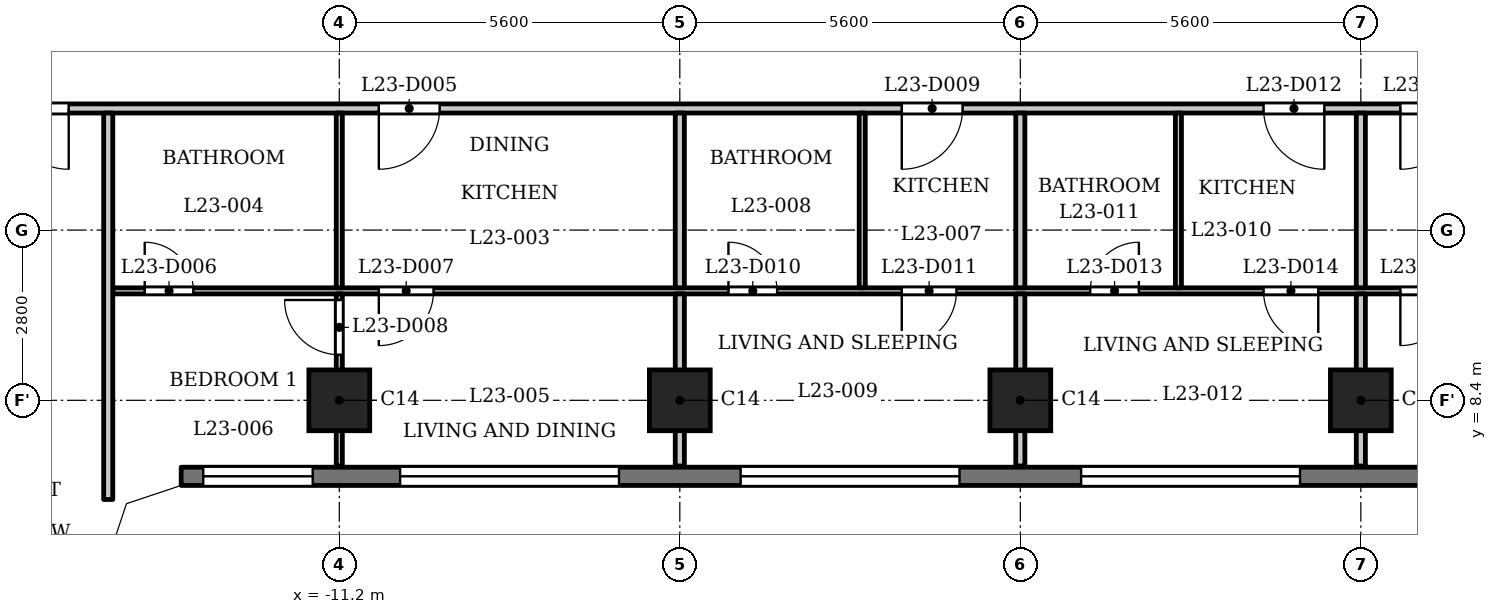
"""IFC4 building model, lengths in metres.
Left out: names, types, materials, properties, quantities, classifications, styles, units other than length and angle.
Written with IfcOpenShell. Run it as: python <this file> out.ifc"""

import sys

from ifc_helpers import new_model, si_unit, direction, frame, frame_2d, origin, origin_2d, place, context, subcontext, project, spatial, polyline, rectangle, outline, extrude, element, fill, save


model = new_model("IFC4")
c1 = context("Model", 3, precision=1e-05, world=origin(), true_north=direction((0.0, 1.0)))
c2 = subcontext(c1, "Body", "Model", "MODEL_VIEW")
j1 = project(units=[si_unit("LENGTHUNIT", "METRE"), si_unit("PLANEANGLEUNIT", "RADIAN")], contexts=[c1])
p1 = place(None, origin())
s1 = spatial("IfcSite", under=j1, at=p1, CompositionType="ELEMENT")
p2 = place(p1, origin())
s2 = spatial("IfcBuilding", under=s1, at=p2, CompositionType="ELEMENT")
p3 = place(p2, frame((0.0, 0.0, 93.8)))
s3 = spatial("IfcBuildingStorey", under=s2, at=p3, CompositionType="ELEMENT", Elevation=93.8)
for number, where, z_axis, x_axis in (
    (1, (-11.2, 8.4, 0.0), (0.0, 0.0, 1.0), (1.0, 0.0, 0.0)),
    (2, (-5.6, 8.4, 0.0), (0.0, 0.0, 1.0), (1.0, 0.0, 0.0)),
    (3, (0.0, 8.4, 0.0), (0.0, 0.0, 1.0), (1.0, 0.0, 0.0)),
    (4, (5.6, 8.4, 0.0), (0.0, 0.0, 1.0), (1.0, 0.0, 0.0)),
):
    element("IfcColumn", number, at=place(p3, frame(where, z_axis=z_axis, x_axis=x_axis)), inside=s3, PredefinedType="COLUMN", context=c2, shape_type="SweptSolid", body=[
        extrude(rectangle(XDim=1.0, YDim=1.0, at=origin_2d()), origin(), (0.0, 0.0, 1.0), 3.5),
    ])
p4 = place(p3, frame((-13.8, 7.15, 0.0), z_axis=(0.0, 0.0, 1.0), x_axis=(1.0, 0.0, 0.0)))
e5 = element("IfcWall", 5, at=p4, inside=s3, PredefinedType="SOLIDWALL", context=c2, shape_type="SweptSolid", body=[
    extrude(rectangle(XDim=27.6, YDim=0.3, at=frame_2d((13.8, 0.0))), origin(), (0.0, 0.0, 1.0), 3.2),
])
p5 = place(p4, frame((0.363, 0.0, 0.9)))
e6 = element("IfcOpeningElement", 6, at=p5, cuts=e5, PredefinedType="OPENING", context=c2, shape_type="SweptSolid", body=[
    extrude(rectangle(XDim=1.8, YDim=1.25, at=frame_2d((0.9, 0.625))), frame((0.0, 0.16, 0.0), z_axis=(0.0, -1.0, 0.0), x_axis=(1.0, 0.0, 0.0)), (0.0, 0.0, 1.0), 0.32),
])
p6 = place(p4, frame((3.6, 0.0, 1.2)))
e7 = element("IfcOpeningElement", 7, at=p6, cuts=e5, PredefinedType="OPENING", context=c2, shape_type="SweptSolid", body=[
    extrude(rectangle(XDim=3.6, YDim=0.95, at=frame_2d((1.8, 0.475))), frame((0.0, 0.16, 0.0), z_axis=(0.0, -1.0, 0.0), x_axis=(1.0, 0.0, 0.0)), (0.0, 0.0, 1.0), 0.32),
])
p7 = place(p4, frame((9.2, 0.0, 1.2)))
e8 = element("IfcOpeningElement", 8, at=p7, cuts=e5, PredefinedType="OPENING", context=c2, shape_type="SweptSolid", body=[
    extrude(rectangle(XDim=3.6, YDim=0.95, at=frame_2d((1.8, 0.475))), frame((0.0, 0.16, 0.0), z_axis=(0.0, -1.0, 0.0), x_axis=(1.0, 0.0, 0.0)), (0.0, 0.0, 1.0), 0.32),
])
p8 = place(p4, frame((14.8, 0.0, 1.2)))
e9 = element("IfcOpeningElement", 9, at=p8, cuts=e5, PredefinedType="OPENING", context=c2, shape_type="SweptSolid", body=[
    extrude(rectangle(XDim=3.6, YDim=0.95, at=frame_2d((1.8, 0.475))), frame((0.0, 0.16, 0.0), z_axis=(0.0, -1.0, 0.0), x_axis=(1.0, 0.0, 0.0)), (0.0, 0.0, 1.0), 0.32),
])
p9 = place(p4, frame((20.4, 0.0, 1.2)))
e10 = element("IfcOpeningElement", 10, at=p9, cuts=e5, PredefinedType="OPENING", context=c2, shape_type="SweptSolid", body=[
    extrude(rectangle(XDim=3.6, YDim=0.95, at=frame_2d((1.8, 0.475))), frame((0.0, 0.16, 0.0), z_axis=(0.0, -1.0, 0.0), x_axis=(1.0, 0.0, 0.0)), (0.0, 0.0, 1.0), 0.32),
])
p10 = place(p4, frame((25.438, 0.0, 0.9)))
e11 = element("IfcOpeningElement", 11, at=p10, cuts=e5, PredefinedType="OPENING", context=c2, shape_type="SweptSolid", body=[
    extrude(rectangle(XDim=1.8, YDim=1.25, at=frame_2d((0.9, 0.625))), frame((0.0, 0.16, 0.0), z_axis=(0.0, -1.0, 0.0), x_axis=(1.0, 0.0, 0.0)), (0.0, 0.0, 1.0), 0.32),
])
p11 = place(p3, frame((-14.925, 10.2, 0.0), z_axis=(0.0, 0.0, 1.0), x_axis=(1.0, 0.0, 0.0)))
e12 = element("IfcWall", 12, at=p11, inside=s3, PredefinedType="PARTITIONING", context=c2, shape_type="SweptSolid", body=[
    extrude(rectangle(XDim=29.85, YDim=0.1, at=frame_2d((14.925, 0.0))), origin(), (0.0, 0.0, 1.0), 3.2),
])
p12 = place(p11, frame((0.525, 0.0, 0.0)))
e13 = element("IfcOpeningElement", 13, at=p12, cuts=e12, PredefinedType="OPENING", context=c2, shape_type="SweptSolid", body=[
    extrude(rectangle(XDim=0.8, YDim=2.1, at=frame_2d((0.4, 1.05))), frame((0.0, 0.06, 0.0), z_axis=(0.0, -1.0, 0.0), x_axis=(1.0, 0.0, 0.0)), (0.0, 0.0, 1.0), 0.12),
])
p13 = place(p11, frame((4.375, 0.0, 0.0)))
e14 = element("IfcOpeningElement", 14, at=p13, cuts=e12, PredefinedType="OPENING", context=c2, shape_type="SweptSolid", body=[
    extrude(rectangle(XDim=0.9, YDim=2.1, at=frame_2d((0.45, 1.05))), frame((0.0, 0.06, 0.0), z_axis=(0.0, -1.0, 0.0), x_axis=(1.0, 0.0, 0.0)), (0.0, 0.0, 1.0), 0.12),
])
p14 = place(p11, frame((10.125, 0.0, 0.0)))
e15 = element("IfcOpeningElement", 15, at=p14, cuts=e12, PredefinedType="OPENING", context=c2, shape_type="SweptSolid", body=[
    extrude(rectangle(XDim=0.8, YDim=2.1, at=frame_2d((0.4, 1.05))), frame((0.0, 0.06, 0.0), z_axis=(0.0, -1.0, 0.0), x_axis=(1.0, 0.0, 0.0)), (0.0, 0.0, 1.0), 0.12),
])
p15 = place(p11, frame((12.975, 0.0, 0.0)))
e16 = element("IfcOpeningElement", 16, at=p15, cuts=e12, PredefinedType="OPENING", context=c2, shape_type="SweptSolid", body=[
    extrude(rectangle(XDim=0.9, YDim=2.1, at=frame_2d((0.45, 1.05))), frame((0.0, 0.06, 0.0), z_axis=(0.0, -1.0, 0.0), x_axis=(1.0, 0.0, 0.0)), (0.0, 0.0, 1.0), 0.12),
])
p16 = place(p11, frame((16.075, 0.0, 0.0)))
e17 = element("IfcOpeningElement", 17, at=p16, cuts=e12, PredefinedType="OPENING", context=c2, shape_type="SweptSolid", body=[
    extrude(rectangle(XDim=0.8, YDim=2.1, at=frame_2d((0.4, 1.05))), frame((0.0, 0.06, 0.0), z_axis=(0.0, -1.0, 0.0), x_axis=(1.0, 0.0, 0.0)), (0.0, 0.0, 1.0), 0.12),
])
p17 = place(p11, frame((18.925, 0.0, 0.0)))
e18 = element("IfcOpeningElement", 18, at=p17, cuts=e12, PredefinedType="OPENING", context=c2, shape_type="SweptSolid", body=[
    extrude(rectangle(XDim=0.9, YDim=2.1, at=frame_2d((0.45, 1.05))), frame((0.0, 0.06, 0.0), z_axis=(0.0, -1.0, 0.0), x_axis=(1.0, 0.0, 0.0)), (0.0, 0.0, 1.0), 0.12),
])
p18 = place(p11, frame((26.975, 0.0, 0.0)))
e19 = element("IfcOpeningElement", 19, at=p18, cuts=e12, PredefinedType="OPENING", context=c2, shape_type="SweptSolid", body=[
    extrude(rectangle(XDim=0.8, YDim=2.1, at=frame_2d((0.4, 1.05))), frame((0.0, 0.06, 0.0), z_axis=(0.0, -1.0, 0.0), x_axis=(1.0, 0.0, 0.0)), (0.0, 0.0, 1.0), 0.12),
])
p19 = place(p11, frame((21.175, 0.0, 0.0)))
e20 = element("IfcOpeningElement", 20, at=p19, cuts=e12, PredefinedType="OPENING", context=c2, shape_type="SweptSolid", body=[
    extrude(rectangle(XDim=0.9, YDim=2.1, at=frame_2d((0.45, 1.05))), frame((0.0, 0.06, 0.0), z_axis=(0.0, -1.0, 0.0), x_axis=(1.0, 0.0, 0.0)), (0.0, 0.0, 1.0), 0.12),
])
p20 = place(p3, frame((-17.4, 13.2, 0.0), z_axis=(0.0, 0.0, 1.0), x_axis=(1.0, 0.0, 0.0)))
e21 = element("IfcWall", 21, at=p20, inside=s3, PredefinedType="PARTITIONING", context=c2, shape_type="SweptSolid", body=[
    extrude(rectangle(XDim=34.8, YDim=0.15, at=frame_2d((17.4, 0.0))), origin(), (0.0, 0.0, 1.0), 3.2),
])
p21 = place(p20, frame((0.75, 0.0, 0.0)))
e22 = element("IfcOpeningElement", 22, at=p21, cuts=e21, PredefinedType="OPENING", context=c2, shape_type="SweptSolid", body=[
    extrude(rectangle(XDim=1.0, YDim=2.1, at=frame_2d((0.5, 1.05))), frame((0.0, 0.085, 0.0), z_axis=(0.0, -1.0, 0.0), x_axis=(1.0, 0.0, 0.0)), (0.0, 0.0, 1.0), 0.17),
])
p22 = place(p20, frame((33.15, 0.0, 0.0)))
e23 = element("IfcOpeningElement", 23, at=p22, cuts=e21, PredefinedType="OPENING", context=c2, shape_type="SweptSolid", body=[
    extrude(rectangle(XDim=1.0, YDim=2.1, at=frame_2d((0.5, 1.05))), frame((0.0, 0.085, 0.0), z_axis=(0.0, -1.0, 0.0), x_axis=(1.0, 0.0, 0.0)), (0.0, 0.0, 1.0), 0.17),
])
p23 = place(p20, frame((6.85, 0.0, 0.0)))
e24 = element("IfcOpeningElement", 24, at=p23, cuts=e21, PredefinedType="OPENING", context=c2, shape_type="SweptSolid", body=[
    extrude(rectangle(XDim=1.0, YDim=2.1, at=frame_2d((0.5, 1.05))), frame((0.0, 0.085, 0.0), z_axis=(0.0, -1.0, 0.0), x_axis=(1.0, 0.0, 0.0)), (0.0, 0.0, 1.0), 0.17),
])
p24 = place(p20, frame((15.45, 0.0, 0.0)))
e25 = element("IfcOpeningElement", 25, at=p24, cuts=e21, PredefinedType="OPENING", context=c2, shape_type="SweptSolid", body=[
    extrude(rectangle(XDim=1.0, YDim=2.1, at=frame_2d((0.5, 1.05))), frame((0.0, 0.085, 0.0), z_axis=(0.0, -1.0, 0.0), x_axis=(1.0, 0.0, 0.0)), (0.0, 0.0, 1.0), 0.17),
])
p25 = place(p20, frame((21.4, 0.0, 0.0)))
e26 = element("IfcOpeningElement", 26, at=p25, cuts=e21, PredefinedType="OPENING", context=c2, shape_type="SweptSolid", body=[
    extrude(rectangle(XDim=1.0, YDim=2.1, at=frame_2d((0.5, 1.05))), frame((0.0, 0.085, 0.0), z_axis=(0.0, -1.0, 0.0), x_axis=(1.0, 0.0, 0.0)), (0.0, 0.0, 1.0), 0.17),
])
p26 = place(p20, frame((23.65, 0.0, 0.0)))
e27 = element("IfcOpeningElement", 27, at=p26, cuts=e21, PredefinedType="OPENING", context=c2, shape_type="SweptSolid", body=[
    extrude(rectangle(XDim=1.0, YDim=2.1, at=frame_2d((0.5, 1.05))), frame((0.0, 0.085, 0.0), z_axis=(0.0, -1.0, 0.0), x_axis=(1.0, 0.0, 0.0)), (0.0, 0.0, 1.0), 0.17),
])
p27 = place(p3, frame((-15.0, 6.769, 0.0), z_axis=(0.0, 0.0, 1.0), x_axis=(0.0, 1.0, 0.0)))
e28 = element("IfcWall", 28, at=p27, inside=s3, PredefinedType="PARTITIONING", context=c2, shape_type="SweptSolid", body=[
    extrude(rectangle(XDim=6.356, YDim=0.15, at=frame_2d((3.178, 0.0))), origin(), (0.0, 0.0, 1.0), 3.2),
])
p28 = place(p3, frame((-11.2, 7.32, 0.0), z_axis=(0.0, 0.0, 1.0), x_axis=(0.0, 1.0, 0.0)))
e29 = element("IfcWall", 29, at=p28, inside=s3, PredefinedType="PARTITIONING", context=c2, shape_type="SweptSolid", body=[
    extrude(rectangle(XDim=2.83, YDim=0.1, at=frame_2d((1.415, 0.0))), origin(), (0.0, 0.0, 1.0), 3.2),
])
p29 = place(p28, frame((1.83, 0.0, 0.0)))
e30 = element("IfcOpeningElement", 30, at=p29, cuts=e29, PredefinedType="OPENING", context=c2, shape_type="SweptSolid", body=[
    extrude(rectangle(XDim=0.9, YDim=2.1, at=frame_2d((0.45, 1.05))), frame((0.0, 0.06, 0.0), z_axis=(0.0, -1.0, 0.0), x_axis=(1.0, 0.0, 0.0)), (0.0, 0.0, 1.0), 0.12),
])
p30 = place(p3, frame((-11.2, 10.25, 0.0), z_axis=(0.0, 0.0, 1.0), x_axis=(0.0, 1.0, 0.0)))
e31 = element("IfcWall", 31, at=p30, inside=s3, PredefinedType="PARTITIONING", context=c2, shape_type="SweptSolid", body=[
    extrude(rectangle(XDim=2.875, YDim=0.1, at=frame_2d((1.438, 0.0))), origin(), (0.0, 0.0, 1.0), 3.2),
])
p31 = place(p3, frame((-5.6, 7.32, 0.0), z_axis=(0.0, 0.0, 1.0), x_axis=(0.0, 1.0, 0.0)))
e32 = element("IfcWall", 32, at=p31, inside=s3, PredefinedType="PARTITIONING", context=c2, shape_type="SweptSolid", body=[
    extrude(rectangle(XDim=2.83, YDim=0.15, at=frame_2d((1.415, 0.0))), origin(), (0.0, 0.0, 1.0), 3.2),
])
p32 = place(p3, frame((-5.6, 10.25, 0.0), z_axis=(0.0, 0.0, 1.0), x_axis=(0.0, 1.0, 0.0)))
e33 = element("IfcWall", 33, at=p32, inside=s3, PredefinedType="PARTITIONING", context=c2, shape_type="SweptSolid", body=[
    extrude(rectangle(XDim=2.875, YDim=0.15, at=frame_2d((1.438, 0.0))), origin(), (0.0, 0.0, 1.0), 3.2),
])
p33 = place(p3, frame((-2.6, 10.25, 0.0), z_axis=(0.0, 0.0, 1.0), x_axis=(0.0, 1.0, 0.0)))
e34 = element("IfcWall", 34, at=p33, inside=s3, PredefinedType="PARTITIONING", context=c2, shape_type="SweptSolid", body=[
    extrude(rectangle(XDim=2.875, YDim=0.1, at=frame_2d((1.438, 0.0))), origin(), (0.0, 0.0, 1.0), 3.2),
])
p34 = place(p3, frame((0.0, 7.32, 0.0), z_axis=(0.0, 0.0, 1.0), x_axis=(0.0, 1.0, 0.0)))
e35 = element("IfcWall", 35, at=p34, inside=s3, PredefinedType="PARTITIONING", context=c2, shape_type="SweptSolid", body=[
    extrude(rectangle(XDim=2.83, YDim=0.15, at=frame_2d((1.415, 0.0))), origin(), (0.0, 0.0, 1.0), 3.2),
])
p35 = place(p3, frame((0.0, 10.25, 0.0), z_axis=(0.0, 0.0, 1.0), x_axis=(0.0, 1.0, 0.0)))
e36 = element("IfcWall", 36, at=p35, inside=s3, PredefinedType="PARTITIONING", context=c2, shape_type="SweptSolid", body=[
    extrude(rectangle(XDim=2.875, YDim=0.15, at=frame_2d((1.438, 0.0))), origin(), (0.0, 0.0, 1.0), 3.2),
])
p36 = place(p3, frame((2.6, 10.25, 0.0), z_axis=(0.0, 0.0, 1.0), x_axis=(0.0, 1.0, 0.0)))
e37 = element("IfcWall", 37, at=p36, inside=s3, PredefinedType="PARTITIONING", context=c2, shape_type="SweptSolid", body=[
    extrude(rectangle(XDim=2.875, YDim=0.1, at=frame_2d((1.438, 0.0))), origin(), (0.0, 0.0, 1.0), 3.2),
])
p37 = place(p3, frame((5.6, 7.32, 0.0), z_axis=(0.0, 0.0, 1.0), x_axis=(0.0, 1.0, 0.0)))
e38 = element("IfcWall", 38, at=p37, inside=s3, PredefinedType="PARTITIONING", context=c2, shape_type="SweptSolid", body=[
    extrude(rectangle(XDim=2.83, YDim=0.15, at=frame_2d((1.415, 0.0))), origin(), (0.0, 0.0, 1.0), 3.2),
])
p38 = place(p3, frame((5.6, 10.25, 0.0), z_axis=(0.0, 0.0, 1.0), x_axis=(0.0, 1.0, 0.0)))
e39 = element("IfcWall", 39, at=p38, inside=s3, PredefinedType="PARTITIONING", context=c2, shape_type="SweptSolid", body=[
    extrude(rectangle(XDim=2.875, YDim=0.15, at=frame_2d((1.438, 0.0))), origin(), (0.0, 0.0, 1.0), 3.2),
])
p39 = place(p3, origin())
e40 = element("IfcWall", 40, at=p39, inside=s3, PredefinedType="SOLIDWALL", context=c2, shape_type="SweptSolid", body=[
    extrude(outline(polyline([(-13.849, 7.3), (-14.937, 6.937), (-15.3, 5.849), (-15.3, 5.8), (-15.0, 5.8), (-14.7, 6.7), (-13.8, 7.0), (-13.8, 7.3), (-13.849, 7.3)])), origin(), (0.0, 0.0, 1.0), 3.2),
])
p40 = place(p21, origin())
e41 = element("IfcDoor", 41, at=p40, inside=s3, OperationType="SINGLE_SWING_RIGHT", PredefinedType="DOOR", context=c2, shape_type="SweptSolid", body=[
    extrude(rectangle(XDim=1.0, YDim=2.1, at=frame_2d((0.5, 1.05))), frame((0.0, 0.025, 0.0), z_axis=(0.0, -1.0, 0.0), x_axis=(1.0, 0.0, 0.0)), (0.0, 0.0, 1.0), 0.05),
])
fill(e22, e41)
p41 = place(p23, origin())
e42 = element("IfcDoor", 42, at=p41, inside=s3, OperationType="SINGLE_SWING_LEFT", PredefinedType="DOOR", context=c2, shape_type="SweptSolid", body=[
    extrude(rectangle(XDim=1.0, YDim=2.1, at=frame_2d((0.5, 1.05))), frame((0.0, 0.025, 0.0), z_axis=(0.0, -1.0, 0.0), x_axis=(1.0, 0.0, 0.0)), (0.0, 0.0, 1.0), 0.05),
])
fill(e24, e42)
p42 = place(p12, origin())
e43 = element("IfcDoor", 43, at=p42, inside=s3, OperationType="SINGLE_SWING_RIGHT", PredefinedType="DOOR", context=c2, shape_type="SweptSolid", body=[
    extrude(rectangle(XDim=0.8, YDim=2.1, at=frame_2d((0.4, 1.05))), frame((0.0, 0.025, 0.0), z_axis=(0.0, -1.0, 0.0), x_axis=(1.0, 0.0, 0.0)), (0.0, 0.0, 1.0), 0.05),
])
fill(e13, e43)
p43 = place(p13, origin())
e44 = element("IfcDoor", 44, at=p43, inside=s3, OperationType="SINGLE_SWING_LEFT", PredefinedType="DOOR", context=c2, shape_type="SweptSolid", body=[
    extrude(rectangle(XDim=0.9, YDim=2.1, at=frame_2d((0.45, 1.05))), frame((0.0, 0.025, 0.0), z_axis=(0.0, -1.0, 0.0), x_axis=(1.0, 0.0, 0.0)), (0.0, 0.0, 1.0), 0.05),
])
fill(e14, e44)
p44 = place(p29, origin())
e45 = element("IfcDoor", 45, at=p44, inside=s3, OperationType="SINGLE_SWING_LEFT", PredefinedType="DOOR", context=c2, shape_type="SweptSolid", body=[
    extrude(rectangle(XDim=0.9, YDim=2.1, at=frame_2d((0.45, 1.05))), frame((0.0, 0.025, 0.0), z_axis=(0.0, -1.0, 0.0), x_axis=(1.0, 0.0, 0.0)), (0.0, 0.0, 1.0), 0.05),
])
fill(e30, e45)
p45 = place(p24, origin())
e46 = element("IfcDoor", 46, at=p45, inside=s3, OperationType="SINGLE_SWING_LEFT", PredefinedType="DOOR", context=c2, shape_type="SweptSolid", body=[
    extrude(rectangle(XDim=1.0, YDim=2.1, at=frame_2d((0.5, 1.05))), frame((0.0, 0.025, 0.0), z_axis=(0.0, -1.0, 0.0), x_axis=(1.0, 0.0, 0.0)), (0.0, 0.0, 1.0), 0.05),
])
fill(e25, e46)
p46 = place(p14, origin())
e47 = element("IfcDoor", 47, at=p46, inside=s3, OperationType="SINGLE_SWING_RIGHT", PredefinedType="DOOR", context=c2, shape_type="SweptSolid", body=[
    extrude(rectangle(XDim=0.8, YDim=2.1, at=frame_2d((0.4, 1.05))), frame((0.0, 0.025, 0.0), z_axis=(0.0, -1.0, 0.0), x_axis=(1.0, 0.0, 0.0)), (0.0, 0.0, 1.0), 0.05),
])
fill(e15, e47)
p47 = place(p15, origin())
e48 = element("IfcDoor", 48, at=p47, inside=s3, OperationType="SINGLE_SWING_LEFT", PredefinedType="DOOR", context=c2, shape_type="SweptSolid", body=[
    extrude(rectangle(XDim=0.9, YDim=2.1, at=frame_2d((0.45, 1.05))), frame((0.0, 0.025, 0.0), z_axis=(0.0, -1.0, 0.0), x_axis=(1.0, 0.0, 0.0)), (0.0, 0.0, 1.0), 0.05),
])
fill(e16, e48)
p48 = place(p25, origin())
e49 = element("IfcDoor", 49, at=p48, inside=s3, OperationType="SINGLE_SWING_RIGHT", PredefinedType="DOOR", context=c2, shape_type="SweptSolid", body=[
    extrude(rectangle(XDim=1.0, YDim=2.1, at=frame_2d((0.5, 1.05))), frame((0.0, 0.025, 0.0), z_axis=(0.0, -1.0, 0.0), x_axis=(1.0, 0.0, 0.0)), (0.0, 0.0, 1.0), 0.05),
])
fill(e26, e49)
p49 = place(p16, origin())
e50 = element("IfcDoor", 50, at=p49, inside=s3, OperationType="SINGLE_SWING_LEFT", PredefinedType="DOOR", context=c2, shape_type="SweptSolid", body=[
    extrude(rectangle(XDim=0.8, YDim=2.1, at=frame_2d((0.4, 1.05))), frame((0.0, 0.025, 0.0), z_axis=(0.0, -1.0, 0.0), x_axis=(1.0, 0.0, 0.0)), (0.0, 0.0, 1.0), 0.05),
])
fill(e17, e50)
p50 = place(p17, origin())
e51 = element("IfcDoor", 51, at=p50, inside=s3, OperationType="SINGLE_SWING_RIGHT", PredefinedType="DOOR", context=c2, shape_type="SweptSolid", body=[
    extrude(rectangle(XDim=0.9, YDim=2.1, at=frame_2d((0.45, 1.05))), frame((0.0, 0.025, 0.0), z_axis=(0.0, -1.0, 0.0), x_axis=(1.0, 0.0, 0.0)), (0.0, 0.0, 1.0), 0.05),
])
fill(e18, e51)
p51 = place(p26, origin())
e52 = element("IfcDoor", 52, at=p51, inside=s3, OperationType="SINGLE_SWING_LEFT", PredefinedType="DOOR", context=c2, shape_type="SweptSolid", body=[
    extrude(rectangle(XDim=1.0, YDim=2.1, at=frame_2d((0.5, 1.05))), frame((0.0, 0.025, 0.0), z_axis=(0.0, -1.0, 0.0), x_axis=(1.0, 0.0, 0.0)), (0.0, 0.0, 1.0), 0.05),
])
fill(e27, e52)
p52 = place(p19, origin())
e53 = element("IfcDoor", 53, at=p52, inside=s3, OperationType="SINGLE_SWING_LEFT", PredefinedType="DOOR", context=c2, shape_type="SweptSolid", body=[
    extrude(rectangle(XDim=0.9, YDim=2.1, at=frame_2d((0.45, 1.05))), frame((0.0, 0.025, 0.0), z_axis=(0.0, -1.0, 0.0), x_axis=(1.0, 0.0, 0.0)), (0.0, 0.0, 1.0), 0.05),
])
fill(e20, e53)
p53 = place(p5, origin())
e54 = element("IfcWindow", 54, at=p53, inside=s3, PartitioningType="SINGLE_PANEL", PredefinedType="WINDOW", context=c2, shape_type="SweptSolid", body=[
    extrude(rectangle(XDim=1.8, YDim=1.25, at=frame_2d((0.9, 0.625))), frame((0.0, 0.03, 0.0), z_axis=(0.0, -1.0, 0.0), x_axis=(1.0, 0.0, 0.0)), (0.0, 0.0, 1.0), 0.06),
])
fill(e6, e54)
p54 = place(p6, origin())
e55 = element("IfcWindow", 55, at=p54, inside=s3, PartitioningType="SINGLE_PANEL", PredefinedType="WINDOW", context=c2, shape_type="SweptSolid", body=[
    extrude(rectangle(XDim=3.6, YDim=0.95, at=frame_2d((1.8, 0.475))), frame((0.0, 0.03, 0.0), z_axis=(0.0, -1.0, 0.0), x_axis=(1.0, 0.0, 0.0)), (0.0, 0.0, 1.0), 0.06),
])
fill(e7, e55)
p55 = place(p7, origin())
e56 = element("IfcWindow", 56, at=p55, inside=s3, PartitioningType="SINGLE_PANEL", PredefinedType="WINDOW", context=c2, shape_type="SweptSolid", body=[
    extrude(rectangle(XDim=3.6, YDim=0.95, at=frame_2d((1.8, 0.475))), frame((0.0, 0.03, 0.0), z_axis=(0.0, -1.0, 0.0), x_axis=(1.0, 0.0, 0.0)), (0.0, 0.0, 1.0), 0.06),
])
fill(e8, e56)
p56 = place(p8, origin())
e57 = element("IfcWindow", 57, at=p56, inside=s3, PartitioningType="SINGLE_PANEL", PredefinedType="WINDOW", context=c2, shape_type="SweptSolid", body=[
    extrude(rectangle(XDim=3.6, YDim=0.95, at=frame_2d((1.8, 0.475))), frame((0.0, 0.03, 0.0), z_axis=(0.0, -1.0, 0.0), x_axis=(1.0, 0.0, 0.0)), (0.0, 0.0, 1.0), 0.06),
])
fill(e9, e57)
save(model, sys.argv[1])
